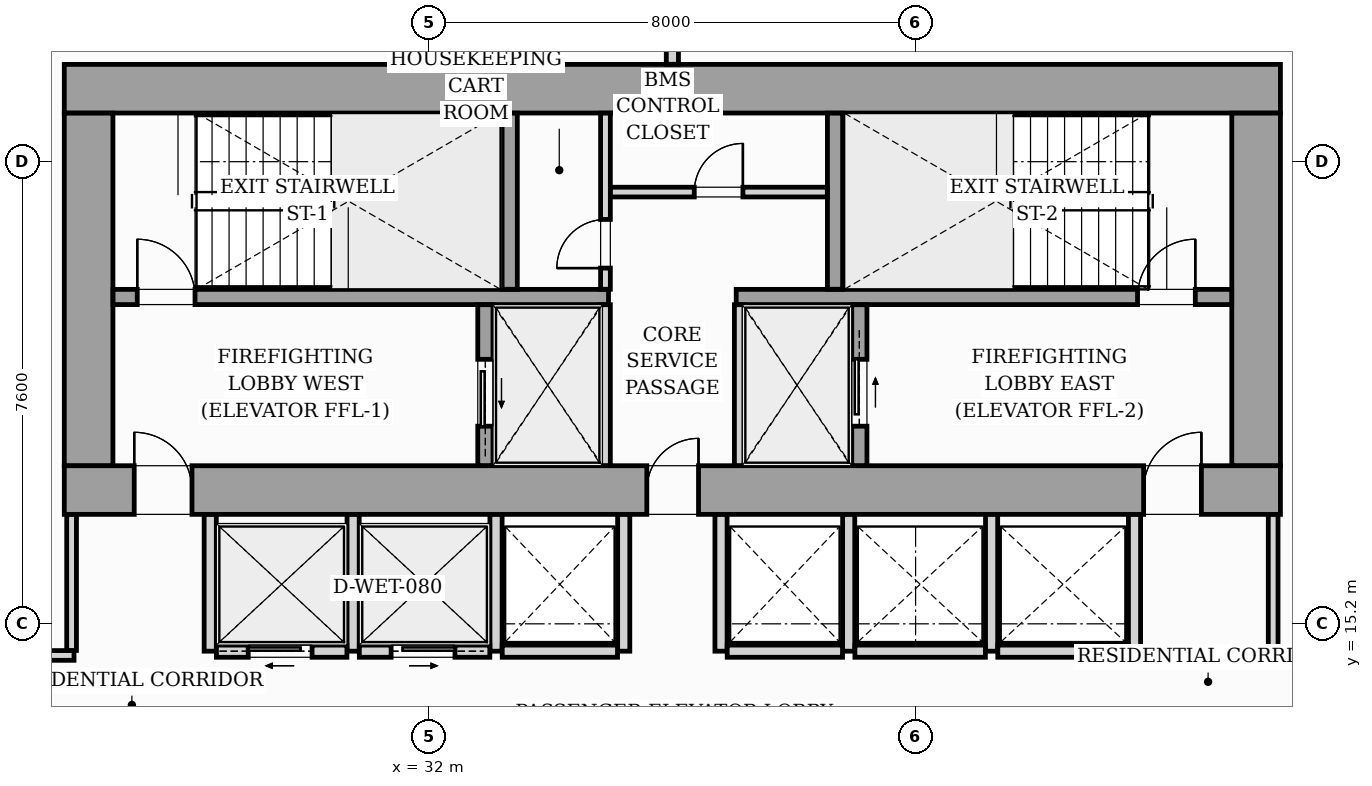
"""IFC4 building model, lengths in metres.
Left out: names, types, materials, properties, quantities, classifications, styles, units other than length and angle.
Written with IfcOpenShell. Run it as: python <this file> out.ifc"""

import sys

from ifc_helpers import new_model, si_unit, direction, frame, frame_2d, origin, origin_2d, place, context, subcontext, project, spatial, rectangle, i_section, extrude, source, transform, mapped, element, fill, save


model = new_model("IFC4")
c1 = context("Model", 3, precision=1e-05, world=origin(), true_north=direction((0.0, 1.0)))
c2 = subcontext(c1, "Body", "Model", "MODEL_VIEW")
j1 = project(units=[si_unit("LENGTHUNIT", "METRE"), si_unit("PLANEANGLEUNIT", "RADIAN")], contexts=[c1])
p1 = place(None, origin())
s1 = spatial("IfcSite", under=j1, at=p1, CompositionType="ELEMENT")
p2 = place(p1, origin())
s2 = spatial("IfcBuilding", under=s1, at=p2, CompositionType="ELEMENT")
p3 = place(p2, frame((0.0, 0.0, 48.6)))
s3 = spatial("IfcBuildingStorey", under=s2, at=p3, CompositionType="ELEMENT", Elevation=48.6)
m1 = source(origin(), c2, "Body", "SweptSolid", [
    extrude(i_section(OverallWidth=0.437, OverallDepth=0.514, WebThickness=0.061, FlangeThickness=0.097, FilletRadius=0.018, at=origin_2d()), origin(), (0.0, 0.0, 1.0), 3.196),
])
for number, where, z_axis, x_axis in (
    (1, (26.4, 17.4, 0.002), (0.0, 0.0, 1.0), (1.0, 0.0, 0.0)),
    (2, (33.12, 17.4, 0.002), (0.0, 0.0, 1.0), (1.0, 0.0, 0.0)),
    (3, (38.88, 17.4, 0.002), (0.0, 0.0, 1.0), (1.0, 0.0, 0.0)),
    (4, (45.6, 17.4, 0.002), (0.0, 0.0, 1.0), (1.0, 0.0, 0.0)),
    (5, (26.4, 24.0, 0.002), (0.0, 0.0, 1.0), (1.0, 0.0, 0.0)),
    (6, (33.12, 24.0, 0.002), (0.0, 0.0, 1.0), (1.0, 0.0, 0.0)),
    (7, (38.88, 24.0, 0.002), (0.0, 0.0, 1.0), (1.0, 0.0, 0.0)),
    (8, (45.6, 24.0, 0.002), (0.0, 0.0, 1.0), (1.0, 0.0, 0.0)),
):
    element("IfcColumn", number, at=place(p3, frame(where, z_axis=z_axis, x_axis=x_axis)), inside=s3, PredefinedType="PILASTER", context=c2, shape_type="MappedRepresentation", body=[
        mapped(m1, transform((0.0, 0.0, 0.0), scale=1.0)),
    ])
p4 = place(p3, frame((26.0, 17.4, 0.0), z_axis=(0.0, 0.0, 1.0), x_axis=(1.0, 0.0, 0.0)))
e9 = element("IfcWall", 9, at=p4, inside=s3, PredefinedType="SHEAR", context=c2, shape_type="SweptSolid", body=[
    extrude(rectangle(XDim=20.0, YDim=0.8, at=frame_2d((10.0, 0.0))), origin(), (0.0, 0.0, 1.0), 3.2),
])
p5 = place(p4, frame((1.15, 0.0, 0.0)))
e10 = element("IfcOpeningElement", 10, at=p5, cuts=e9, PredefinedType="OPENING", context=c2, shape_type="SweptSolid", body=[
    extrude(rectangle(XDim=0.95, YDim=2.06, at=frame_2d((0.475, 1.03))), frame((0.0, 0.41, 0.0), z_axis=(0.0, -1.0, 0.0), x_axis=(1.0, 0.0, 0.0)), (0.0, 0.0, 1.0), 0.82),
])
p6 = place(p4, frame((9.58, 0.0, 0.0)))
e11 = element("IfcOpeningElement", 11, at=p6, cuts=e9, PredefinedType="OPENING", context=c2, shape_type="SweptSolid", body=[
    extrude(rectangle(XDim=0.85, YDim=2.0, at=frame_2d((0.425, 1.0))), frame((0.0, 0.41, 0.0), z_axis=(0.0, -1.0, 0.0), x_axis=(1.0, 0.0, 0.0)), (0.0, 0.0, 1.0), 0.82),
])
p7 = place(p4, frame((17.75, 0.0, 0.0)))
e12 = element("IfcOpeningElement", 12, at=p7, cuts=e9, PredefinedType="OPENING", context=c2, shape_type="SweptSolid", body=[
    extrude(rectangle(XDim=0.95, YDim=2.06, at=frame_2d((0.475, 1.03))), frame((0.0, 0.41, 0.0), z_axis=(0.0, -1.0, 0.0), x_axis=(1.0, 0.0, 0.0)), (0.0, 0.0, 1.0), 0.82),
])
p8 = place(p3, frame((26.0, 24.0, 0.0), z_axis=(0.0, 0.0, 1.0), x_axis=(1.0, 0.0, 0.0)))
e13 = element("IfcWall", 13, at=p8, inside=s3, PredefinedType="SHEAR", context=c2, shape_type="SweptSolid", body=[
    extrude(rectangle(XDim=20.0, YDim=0.8, at=frame_2d((10.0, 0.0))), origin(), (0.0, 0.0, 1.0), 3.2),
])
for number, where, z_axis, x_axis in (
    (14, (26.4, 17.802, 0.0), (0.0, 0.0, 1.0), (0.0, 1.0, 0.0)),
    (15, (45.6, 17.802, 0.0), (0.0, 0.0, 1.0), (0.0, 1.0, 0.0)),
):
    element("IfcWall", number, at=place(p3, frame(where, z_axis=z_axis, x_axis=x_axis)), inside=s3, PredefinedType="SHEAR", context=c2, shape_type="SweptSolid", body=[
        extrude(rectangle(XDim=5.796, YDim=0.8, at=frame_2d((2.898, 0.0))), origin(), (0.0, 0.0, 1.0), 3.2),
    ])
p9 = place(p3, frame((26.802, 20.575, 0.0), z_axis=(0.0, 0.0, 1.0), x_axis=(1.0, 0.0, 0.0)))
e16 = element("IfcWall", 16, at=p9, inside=s3, PredefinedType="SOLIDWALL", context=c2, shape_type="SweptSolid", body=[
    extrude(rectangle(XDim=8.148, YDim=0.25, at=frame_2d((4.074, 0.0))), origin(), (0.0, 0.0, 1.0), 3.2),
])
p10 = place(p9, frame((0.398, 0.0, 0.0)))
e17 = element("IfcOpeningElement", 17, at=p10, cuts=e16, PredefinedType="OPENING", context=c2, shape_type="SweptSolid", body=[
    extrude(rectangle(XDim=0.95, YDim=2.06, at=frame_2d((0.475, 1.03))), frame((0.0, 0.135, 0.0), z_axis=(0.0, -1.0, 0.0), x_axis=(1.0, 0.0, 0.0)), (0.0, 0.0, 1.0), 0.27),
])
p11 = place(p3, frame((37.05, 20.575, 0.0), z_axis=(0.0, 0.0, 1.0), x_axis=(1.0, 0.0, 0.0)))
e18 = element("IfcWall", 18, at=p11, inside=s3, PredefinedType="SOLIDWALL", context=c2, shape_type="SweptSolid", body=[
    extrude(rectangle(XDim=8.148, YDim=0.25, at=frame_2d((4.074, 0.0))), origin(), (0.0, 0.0, 1.0), 3.2),
])
p12 = place(p11, frame((6.6, 0.0, 0.0)))
e19 = element("IfcOpeningElement", 19, at=p12, cuts=e18, PredefinedType="OPENING", context=c2, shape_type="SweptSolid", body=[
    extrude(rectangle(XDim=0.95, YDim=2.06, at=frame_2d((0.475, 1.03))), frame((0.0, 0.135, 0.0), z_axis=(0.0, -1.0, 0.0), x_axis=(1.0, 0.0, 0.0)), (0.0, 0.0, 1.0), 0.27),
])
for number, where, z_axis, x_axis in (
    (20, (33.325, 20.702, 0.0), (0.0, 0.0, 1.0), (0.0, 1.0, 0.0)),
    (21, (38.675, 20.702, 0.0), (0.0, 0.0, 1.0), (0.0, 1.0, 0.0)),
):
    element("IfcWall", number, at=place(p3, frame(where, z_axis=z_axis, x_axis=x_axis)), inside=s3, PredefinedType="SOLIDWALL", context=c2, shape_type="SweptSolid", body=[
        extrude(rectangle(XDim=2.896, YDim=0.25, at=frame_2d((1.448, 0.0))), origin(), (0.0, 0.0, 1.0), 3.2),
    ])
p13 = place(p3, frame((32.925, 17.802, 0.0), z_axis=(0.0, 0.0, 1.0), x_axis=(0.0, 1.0, 0.0)))
e22 = element("IfcWall", 22, at=p13, inside=s3, PredefinedType="SOLIDWALL", context=c2, shape_type="SweptSolid", body=[
    extrude(rectangle(XDim=2.646, YDim=0.25, at=frame_2d((1.323, 0.0))), origin(), (0.0, 0.0, 1.0), 3.2),
])
p14 = place(p13, frame((0.648, 0.0, 0.0)))
e23 = element("IfcOpeningElement", 23, at=p14, cuts=e22, PredefinedType="OPENING", context=c2, shape_type="SweptSolid", body=[
    extrude(rectangle(XDim=1.1, YDim=2.08, at=frame_2d((0.55, 1.04))), frame((0.0, 0.135, 0.0), z_axis=(0.0, -1.0, 0.0), x_axis=(1.0, 0.0, 0.0)), (0.0, 0.0, 1.0), 0.27),
])
for number, where, z_axis, x_axis in (
    (24, (34.9, 17.802, 0.0), (0.0, 0.0, 1.0), (0.0, 1.0, 0.0)),
    (25, (37.1, 17.802, 0.0), (0.0, 0.0, 1.0), (0.0, 1.0, 0.0)),
):
    element("IfcWall", number, at=place(p3, frame(where, z_axis=z_axis, x_axis=x_axis)), inside=s3, PredefinedType="PARTITIONING", context=c2, shape_type="SweptSolid", body=[
        extrude(rectangle(XDim=2.646, YDim=0.16, at=frame_2d((1.323, 0.0))), origin(), (0.0, 0.0, 1.0), 2.94),
    ])
p15 = place(p3, frame((39.075, 17.802, 0.0), z_axis=(0.0, 0.0, 1.0), x_axis=(0.0, 1.0, 0.0)))
e26 = element("IfcWall", 26, at=p15, inside=s3, PredefinedType="SOLIDWALL", context=c2, shape_type="SweptSolid", body=[
    extrude(rectangle(XDim=2.646, YDim=0.25, at=frame_2d((1.323, 0.0))), origin(), (0.0, 0.0, 1.0), 3.2),
])
p16 = place(p15, frame((0.648, 0.0, 0.0)))
e27 = element("IfcOpeningElement", 27, at=p16, cuts=e26, PredefinedType="OPENING", context=c2, shape_type="SweptSolid", body=[
    extrude(rectangle(XDim=1.1, YDim=2.08, at=frame_2d((0.55, 1.04))), frame((0.0, 0.135, 0.0), z_axis=(0.0, -1.0, 0.0), x_axis=(1.0, 0.0, 0.0)), (0.0, 0.0, 1.0), 0.27),
])
p17 = place(p3, frame((34.9, 20.702, 0.0), z_axis=(0.0, 0.0, 1.0), x_axis=(0.0, 1.0, 0.0)))
e28 = element("IfcWall", 28, at=p17, inside=s3, PredefinedType="PARTITIONING", context=c2, shape_type="SweptSolid", body=[
    extrude(rectangle(XDim=2.896, YDim=0.16, at=frame_2d((1.448, 0.0))), origin(), (0.0, 0.0, 1.0), 2.94),
])
p18 = place(p17, frame((0.348, 0.0, 0.0)))
e29 = element("IfcOpeningElement", 29, at=p18, cuts=e28, PredefinedType="OPENING", context=c2, shape_type="SweptSolid", body=[
    extrude(rectangle(XDim=0.8, YDim=2.05, at=frame_2d((0.4, 1.025))), frame((0.0, 0.09, 0.0), z_axis=(0.0, -1.0, 0.0), x_axis=(1.0, 0.0, 0.0)), (0.0, 0.0, 1.0), 0.18),
])
p19 = place(p3, frame((34.982, 22.3, 0.0), z_axis=(0.0, 0.0, 1.0), x_axis=(1.0, 0.0, 0.0)))
e30 = element("IfcWall", 30, at=p19, inside=s3, PredefinedType="PARTITIONING", context=c2, shape_type="SweptSolid", body=[
    extrude(rectangle(XDim=3.566, YDim=0.16, at=frame_2d((1.783, 0.0))), origin(), (0.0, 0.0, 1.0), 2.94),
])
p20 = place(p19, frame((1.378, 0.0, 0.0)))
e31 = element("IfcOpeningElement", 31, at=p20, cuts=e30, PredefinedType="OPENING", context=c2, shape_type="SweptSolid", body=[
    extrude(rectangle(XDim=0.8, YDim=2.05, at=frame_2d((0.4, 1.025))), frame((0.0, 0.09, 0.0), z_axis=(0.0, -1.0, 0.0), x_axis=(1.0, 0.0, 0.0)), (0.0, 0.0, 1.0), 0.18),
])
for number, where, z_axis, x_axis in (
    (32, (28.4, 14.75, 0.0), (0.0, 0.0, 1.0), (0.0, 1.0, 0.0)),
    (33, (30.75, 14.75, 0.0), (0.0, 0.0, 1.0), (0.0, 1.0, 0.0)),
    (34, (33.1, 14.75, 0.0), (0.0, 0.0, 1.0), (0.0, 1.0, 0.0)),
):
    element("IfcWall", number, at=place(p3, frame(where, z_axis=z_axis, x_axis=x_axis)), inside=s3, PredefinedType="PARTITIONING", context=c2, shape_type="SweptSolid", body=[
        extrude(rectangle(XDim=2.248, YDim=0.2, at=frame_2d((1.124, 0.0))), origin(), (0.0, 0.0, 1.0), 2.94),
    ])
p21 = place(p3, frame((28.502, 14.75, 0.0), z_axis=(0.0, 0.0, 1.0), x_axis=(1.0, 0.0, 0.0)))
e35 = element("IfcWall", 35, at=p21, inside=s3, PredefinedType="PARTITIONING", context=c2, shape_type="SweptSolid", body=[
    extrude(rectangle(XDim=2.146, YDim=0.2, at=frame_2d((1.073, 0.0))), origin(), (0.0, 0.0, 1.0), 2.94),
])
p22 = place(p21, frame((0.523, 0.0, 0.0)))
e36 = element("IfcOpeningElement", 36, at=p22, cuts=e35, PredefinedType="OPENING", context=c2, shape_type="SweptSolid", body=[
    extrude(rectangle(XDim=1.05, YDim=2.08, at=frame_2d((0.525, 1.04))), frame((0.0, 0.11, 0.0), z_axis=(0.0, -1.0, 0.0), x_axis=(1.0, 0.0, 0.0)), (0.0, 0.0, 1.0), 0.22),
])
p23 = place(p3, frame((30.852, 14.75, 0.0), z_axis=(0.0, 0.0, 1.0), x_axis=(1.0, 0.0, 0.0)))
e37 = element("IfcWall", 37, at=p23, inside=s3, PredefinedType="PARTITIONING", context=c2, shape_type="SweptSolid", body=[
    extrude(rectangle(XDim=2.146, YDim=0.2, at=frame_2d((1.073, 0.0))), origin(), (0.0, 0.0, 1.0), 2.94),
])
p24 = place(p23, frame((0.523, 0.0, 0.0)))
e38 = element("IfcOpeningElement", 38, at=p24, cuts=e37, PredefinedType="OPENING", context=c2, shape_type="SweptSolid", body=[
    extrude(rectangle(XDim=1.05, YDim=2.08, at=frame_2d((0.525, 1.04))), frame((0.0, 0.11, 0.0), z_axis=(0.0, -1.0, 0.0), x_axis=(1.0, 0.0, 0.0)), (0.0, 0.0, 1.0), 0.22),
])
p25 = place(p3, frame((35.2, 14.75, 0.0), z_axis=(0.0, 0.0, 1.0), x_axis=(0.0, 1.0, 0.0)))
e39 = element("IfcWall", 39, at=p25, inside=s3, PredefinedType="PARTITIONING", context=c2, shape_type="SweptSolid", body=[
    extrude(rectangle(XDim=2.248, YDim=0.2, at=frame_2d((1.124, 0.0))), origin(), (0.0, 0.0, 1.0), 2.94),
])
p26 = place(p3, frame((33.202, 14.75, 0.0), z_axis=(0.0, 0.0, 1.0), x_axis=(1.0, 0.0, 0.0)))
e40 = element("IfcWall", 40, at=p26, inside=s3, PredefinedType="PARTITIONING", context=c2, shape_type="SweptSolid", body=[
    extrude(rectangle(XDim=1.896, YDim=0.2, at=frame_2d((0.948, 0.0))), origin(), (0.0, 0.0, 1.0), 2.94),
])
for number, where, z_axis, x_axis in (
    (41, (36.8, 14.75, 0.0), (0.0, 0.0, 1.0), (0.0, 1.0, 0.0)),
    (42, (38.9, 14.75, 0.0), (0.0, 0.0, 1.0), (0.0, 1.0, 0.0)),
):
    element("IfcWall", number, at=place(p3, frame(where, z_axis=z_axis, x_axis=x_axis)), inside=s3, PredefinedType="PARTITIONING", context=c2, shape_type="SweptSolid", body=[
        extrude(rectangle(XDim=2.248, YDim=0.2, at=frame_2d((1.124, 0.0))), origin(), (0.0, 0.0, 1.0), 2.94),
    ])
p27 = place(p3, frame((36.902, 14.75, 0.0), z_axis=(0.0, 0.0, 1.0), x_axis=(1.0, 0.0, 0.0)))
e43 = element("IfcWall", 43, at=p27, inside=s3, PredefinedType="PARTITIONING", context=c2, shape_type="SweptSolid", body=[
    extrude(rectangle(XDim=1.896, YDim=0.2, at=frame_2d((0.948, 0.0))), origin(), (0.0, 0.0, 1.0), 2.94),
])
for number, where, z_axis, x_axis in (
    (44, (41.25, 14.75, 0.0), (0.0, 0.0, 1.0), (0.0, 1.0, 0.0)),
    (45, (43.6, 14.75, 0.0), (0.0, 0.0, 1.0), (0.0, 1.0, 0.0)),
):
    element("IfcWall", number, at=place(p3, frame(where, z_axis=z_axis, x_axis=x_axis)), inside=s3, PredefinedType="PARTITIONING", context=c2, shape_type="SweptSolid", body=[
        extrude(rectangle(XDim=2.248, YDim=0.2, at=frame_2d((1.124, 0.0))), origin(), (0.0, 0.0, 1.0), 2.94),
    ])
for number, where, z_axis, x_axis in (
    (46, (39.002, 14.75, 0.0), (0.0, 0.0, 1.0), (1.0, 0.0, 0.0)),
    (47, (41.352, 14.75, 0.0), (0.0, 0.0, 1.0), (1.0, 0.0, 0.0)),
):
    element("IfcWall", number, at=place(p3, frame(where, z_axis=z_axis, x_axis=x_axis)), inside=s3, PredefinedType="PARTITIONING", context=c2, shape_type="SweptSolid", body=[
        extrude(rectangle(XDim=2.146, YDim=0.2, at=frame_2d((1.073, 0.0))), origin(), (0.0, 0.0, 1.0), 2.94),
    ])
p28 = place(p3, frame((36.0, 24.402, 0.0), z_axis=(0.0, 0.0, 1.0), x_axis=(0.0, 1.0, 0.0)))
e48 = element("IfcWall", 48, at=p28, inside=s3, PredefinedType="PARTITIONING", context=c2, shape_type="SweptSolid", body=[
    extrude(rectangle(XDim=3.218, YDim=0.2, at=frame_2d((1.609, 0.0))), origin(), (0.0, 0.0, 1.0), 2.94),
])
p29 = place(p3, frame((15.282, 14.68, 0.0), z_axis=(0.0, 0.0, 1.0), x_axis=(1.0, 0.0, 0.0)))
e49 = element("IfcWall", 49, at=p29, inside=s3, PredefinedType="PARTITIONING", context=c2, shape_type="SweptSolid", body=[
    extrude(rectangle(XDim=10.878, YDim=0.16, at=frame_2d((5.439, 0.0))), origin(), (0.0, 0.0, 1.0), 2.94),
])
p30 = place(p29, frame((4.863, 0.0, 0.0)))
e50 = element("IfcOpeningElement", 50, at=p30, cuts=e49, PredefinedType="OPENING", context=c2, shape_type="SweptSolid", body=[
    extrude(rectangle(XDim=0.95, YDim=2.06, at=frame_2d((0.475, 1.03))), frame((0.0, 0.09, 0.0), z_axis=(0.0, -1.0, 0.0), x_axis=(1.0, 0.0, 0.0)), (0.0, 0.0, 1.0), 0.18),
])
p31 = place(p3, frame((26.12, 14.762, 0.0), z_axis=(0.0, 0.0, 1.0), x_axis=(0.0, 1.0, 0.0)))
e51 = element("IfcWall", 51, at=p31, inside=s3, PredefinedType="PARTITIONING", context=c2, shape_type="SweptSolid", body=[
    extrude(rectangle(XDim=2.236, YDim=0.16, at=frame_2d((1.118, 0.0))), origin(), (0.0, 0.0, 1.0), 2.94),
])
p32 = place(p3, frame((45.84, 14.68, 0.0), z_axis=(0.0, 0.0, 1.0), x_axis=(1.0, 0.0, 0.0)))
e52 = element("IfcWall", 52, at=p32, inside=s3, PredefinedType="PARTITIONING", context=c2, shape_type="SweptSolid", body=[
    extrude(rectangle(XDim=4.428, YDim=0.16, at=frame_2d((2.214, 0.0))), origin(), (0.0, 0.0, 1.0), 2.94),
])
p33 = place(p32, frame((1.84, 0.0, 0.0)))
e53 = element("IfcOpeningElement", 53, at=p33, cuts=e52, PredefinedType="OPENING", context=c2, shape_type="SweptSolid", body=[
    extrude(rectangle(XDim=0.95, YDim=2.06, at=frame_2d((0.475, 1.03))), frame((0.0, 0.09, 0.0), z_axis=(0.0, -1.0, 0.0), x_axis=(1.0, 0.0, 0.0)), (0.0, 0.0, 1.0), 0.18),
])
p34 = place(p3, frame((45.88, 14.762, 0.0), z_axis=(0.0, 0.0, 1.0), x_axis=(0.0, 1.0, 0.0)))
e54 = element("IfcWall", 54, at=p34, inside=s3, PredefinedType="PARTITIONING", context=c2, shape_type="SweptSolid", body=[
    extrude(rectangle(XDim=2.236, YDim=0.16, at=frame_2d((1.118, 0.0))), origin(), (0.0, 0.0, 1.0), 2.94),
])
m2 = source(origin(), c2, "Body", "SweptSolid", [
    extrude(rectangle(XDim=0.95, YDim=2.06, at=frame_2d((0.475, 1.03))), frame((0.0, 0.025, 0.0), z_axis=(0.0, -1.0, 0.0), x_axis=(1.0, 0.0, 0.0)), (0.0, 0.0, 1.0), 0.05),
])
p35 = place(p5, origin())
e55 = element("IfcDoor", 55, at=p35, inside=s3, OperationType="SINGLE_SWING_LEFT", PredefinedType="DOOR", context=c2, shape_type="MappedRepresentation", body=[
    mapped(m2, transform((0.0, 0.0, 0.0), scale=1.0)),
])
fill(e10, e55)
m3 = source(origin(), c2, "Body", "SweptSolid", [
    extrude(rectangle(XDim=0.85, YDim=2.0, at=frame_2d((0.425, 1.0))), frame((0.0, 0.025, 0.0), z_axis=(0.0, -1.0, 0.0), x_axis=(1.0, 0.0, 0.0)), (0.0, 0.0, 1.0), 0.05),
])
p36 = place(p6, origin())
e56 = element("IfcDoor", 56, at=p36, inside=s3, OperationType="SINGLE_SWING_RIGHT", PredefinedType="DOOR", context=c2, shape_type="MappedRepresentation", body=[
    mapped(m3, transform((0.0, 0.0, 0.0), scale=1.0)),
])
fill(e11, e56)
p37 = place(p7, origin())
e57 = element("IfcDoor", 57, at=p37, inside=s3, OperationType="SINGLE_SWING_RIGHT", PredefinedType="DOOR", context=c2, shape_type="MappedRepresentation", body=[
    mapped(m2, transform((0.0, 0.0, 0.0), scale=1.0)),
])
fill(e12, e57)
p38 = place(p10, origin())
e58 = element("IfcDoor", 58, at=p38, inside=s3, OperationType="SINGLE_SWING_LEFT", PredefinedType="DOOR", context=c2, shape_type="MappedRepresentation", body=[
    mapped(m2, transform((0.0, 0.0, 0.0), scale=1.0)),
])
fill(e17, e58)
p39 = place(p12, origin())
e59 = element("IfcDoor", 59, at=p39, inside=s3, OperationType="SINGLE_SWING_RIGHT", PredefinedType="DOOR", context=c2, shape_type="MappedRepresentation", body=[
    mapped(m2, transform((0.0, 0.0, 0.0), scale=1.0)),
])
fill(e19, e59)
m4 = source(origin(), c2, "Body", "SweptSolid", [
    extrude(rectangle(XDim=1.1, YDim=2.08, at=frame_2d((0.55, 1.04))), frame((0.0, 0.025, 0.0), z_axis=(0.0, -1.0, 0.0), x_axis=(1.0, 0.0, 0.0)), (0.0, 0.0, 1.0), 0.05),
])
p40 = place(p14, origin())
e60 = element("IfcDoor", 60, at=p40, inside=s3, OperationType="SLIDING_TO_LEFT", PredefinedType="DOOR", context=c2, shape_type="MappedRepresentation", body=[
    mapped(m4, transform((0.0, 0.0, 0.0), scale=1.0)),
])
fill(e23, e60)
p41 = place(p16, origin())
e61 = element("IfcDoor", 61, at=p41, inside=s3, OperationType="SLIDING_TO_RIGHT", PredefinedType="DOOR", context=c2, shape_type="MappedRepresentation", body=[
    mapped(m4, transform((0.0, 0.0, 0.0), scale=1.0)),
])
fill(e27, e61)
m5 = source(origin(), c2, "Body", "SweptSolid", [
    extrude(rectangle(XDim=0.8, YDim=2.05, at=frame_2d((0.4, 1.025))), frame((0.0, 0.025, 0.0), z_axis=(0.0, -1.0, 0.0), x_axis=(1.0, 0.0, 0.0)), (0.0, 0.0, 1.0), 0.05),
])
p42 = place(p18, origin())
e62 = element("IfcDoor", 62, at=p42, inside=s3, OperationType="SINGLE_SWING_LEFT", PredefinedType="DOOR", context=c2, shape_type="MappedRepresentation", body=[
    mapped(m5, transform((0.0, 0.0, 0.0), scale=1.0)),
])
fill(e29, e62)
p43 = place(p20, origin())
e63 = element("IfcDoor", 63, at=p43, inside=s3, OperationType="SINGLE_SWING_RIGHT", PredefinedType="DOOR", context=c2, shape_type="MappedRepresentation", body=[
    mapped(m5, transform((0.0, 0.0, 0.0), scale=1.0)),
])
fill(e31, e63)
m6 = source(origin(), c2, "Body", "SweptSolid", [
    extrude(rectangle(XDim=1.05, YDim=2.08, at=frame_2d((0.525, 1.04))), frame((0.0, 0.025, 0.0), z_axis=(0.0, -1.0, 0.0), x_axis=(1.0, 0.0, 0.0)), (0.0, 0.0, 1.0), 0.05),
])
p44 = place(p22, origin())
e64 = element("IfcDoor", 64, at=p44, inside=s3, OperationType="SLIDING_TO_LEFT", PredefinedType="DOOR", context=c2, shape_type="MappedRepresentation", body=[
    mapped(m6, transform((0.0, 0.0, 0.0), scale=1.0)),
])
fill(e36, e64)
p45 = place(p24, origin())
e65 = element("IfcDoor", 65, at=p45, inside=s3, OperationType="SLIDING_TO_RIGHT", PredefinedType="DOOR", context=c2, shape_type="MappedRepresentation", body=[
    mapped(m6, transform((0.0, 0.0, 0.0), scale=1.0)),
])
fill(e38, e65)
save(model, sys.argv[1])
